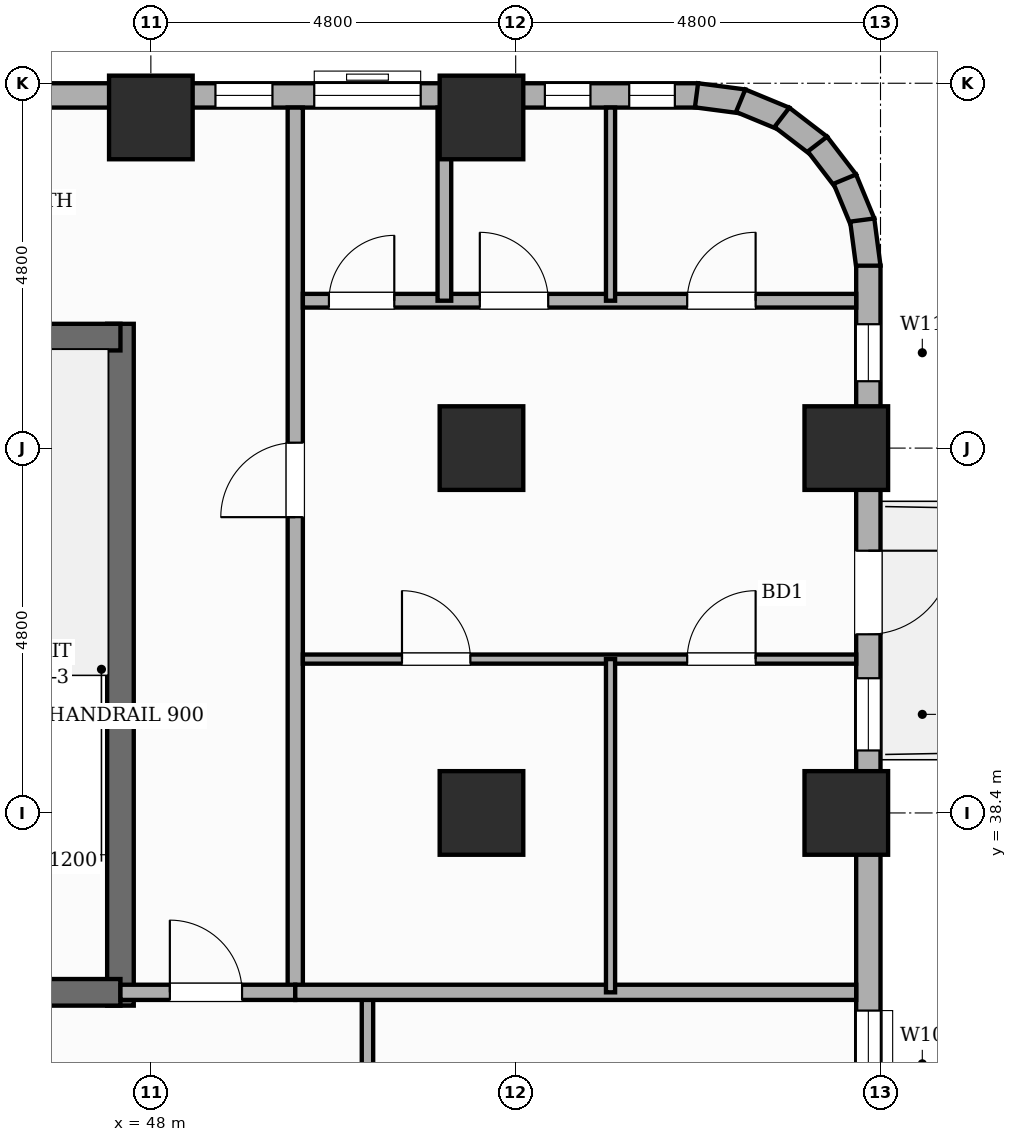
"""IFC4 building model, lengths in metres.
Left out: names, types, materials, properties, quantities, classifications, styles, units other than length and angle.
Written with IfcOpenShell. Run it as: python <this file> out.ifc"""

import sys

from ifc_helpers import new_model, si_unit, direction, frame, frame_2d, origin, origin_2d, place, context, subcontext, project, spatial, rectangle, extrude, element, fill, save


model = new_model("IFC4")
c1 = context("Model", 3, precision=1e-05, world=origin(), true_north=direction((0.0, 1.0)))
c2 = subcontext(c1, "Body", "Model", "MODEL_VIEW")
j1 = project(units=[si_unit("LENGTHUNIT", "METRE"), si_unit("PLANEANGLEUNIT", "RADIAN")], contexts=[c1])
p1 = place(None, origin())
s1 = spatial("IfcSite", under=j1, at=p1, CompositionType="ELEMENT")
p2 = place(p1, origin())
s2 = spatial("IfcBuilding", under=s1, at=p2, CompositionType="ELEMENT")
p3 = place(p2, frame((0.0, 0.0, 68.2)))
s3 = spatial("IfcBuildingStorey", under=s2, at=p3, CompositionType="ELEMENT", Elevation=68.2)
p4 = place(p3, frame((47.6, 35.865, 0.0), z_axis=(0.0, 0.0, 1.0), x_axis=(0.0, 1.0, 0.0)))
e1 = element("IfcWall", 1, at=p4, inside=s3, PredefinedType="SHEAR", context=c2, shape_type="SweptSolid", body=[
    extrude(rectangle(XDim=8.97, YDim=0.35, at=frame_2d((4.485, 0.0))), origin(), (0.0, 0.0, 1.0), 3.6),
])
for number, where, z_axis, x_axis in (
    (2, (44.02, 36.04, 0.0), (0.0, 0.0, 1.0), (1.0, 0.0, 0.0)),
    (3, (44.02, 44.66, 0.0), (0.0, 0.0, 1.0), (1.0, 0.0, 0.0)),
):
    element("IfcWall", number, at=place(p3, frame(where, z_axis=z_axis, x_axis=x_axis)), inside=s3, PredefinedType="SHEAR", context=c2, shape_type="SweptSolid", body=[
        extrude(rectangle(XDim=3.58, YDim=0.35, at=frame_2d((1.79, 0.0))), origin(), (0.0, 0.0, 1.0), 3.6),
    ])
for number, where, z_axis, x_axis in (
    (4, (48.0, 47.55, 0.0), (0.0, 0.0, 1.0), (1.0, 0.0, 0.0)),
    (5, (52.35, 38.4, 0.0), (0.0, 0.0, 1.0), (1.0, 0.0, 0.0)),
    (6, (52.35, 43.2, 0.0), (0.0, 0.0, 1.0), (1.0, 0.0, 0.0)),
    (7, (52.35, 47.55, 0.0), (0.0, 0.0, 1.0), (1.0, 0.0, 0.0)),
    (8, (57.15, 38.4, 0.0), (0.0, 0.0, 1.0), (1.0, 0.0, 0.0)),
    (9, (57.15, 43.2, 0.0), (0.0, 0.0, 1.0), (1.0, 0.0, 0.0)),
):
    element("IfcColumn", number, at=place(p3, frame(where, z_axis=z_axis, x_axis=x_axis)), inside=s3, PredefinedType="COLUMN", context=c2, shape_type="SweptSolid", body=[
        extrude(rectangle(XDim=1.1, YDim=1.1, at=origin_2d()), origin(), (0.0, 0.0, 1.0), 3.6),
    ])
p5 = place(p3, frame((7.2, 47.84, 0.0), z_axis=(0.0, 0.0, 1.0), x_axis=(1.0, 0.0, 0.0)))
e10 = element("IfcWall", 10, at=p5, inside=s3, PredefinedType="STANDARD", context=c2, shape_type="SweptSolid", body=[
    extrude(rectangle(XDim=48.0, YDim=0.32, at=frame_2d((24.0, 0.0))), origin(), (0.0, 0.0, 1.0), 2.53),
])
p6 = place(p5, frame((28.803, 0.0, 0.65)))
e11 = element("IfcOpeningElement", 11, at=p6, cuts=e10, PredefinedType="OPENING", context=c2, shape_type="SweptSolid", body=[
    extrude(rectangle(XDim=1.4, YDim=1.1, at=frame_2d((0.7, 0.55))), frame((0.0, 0.17, 0.0), z_axis=(0.0, -1.0, 0.0), x_axis=(1.0, 0.0, 0.0)), (0.0, 0.0, 1.0), 0.34),
])
p7 = place(p5, frame((47.094, 0.0, 0.45)))
e12 = element("IfcOpeningElement", 12, at=p7, cuts=e10, PredefinedType="OPENING", context=c2, shape_type="SweptSolid", body=[
    extrude(rectangle(XDim=0.6, YDim=1.8, at=frame_2d((0.3, 0.9))), frame((0.0, 0.17, 0.0), z_axis=(0.0, -1.0, 0.0), x_axis=(1.0, 0.0, 0.0)), (0.0, 0.0, 1.0), 0.34),
])
p8 = place(p5, frame((18.74, 0.0, 0.45)))
e13 = element("IfcOpeningElement", 13, at=p8, cuts=e10, PredefinedType="OPENING", context=c2, shape_type="SweptSolid", body=[
    extrude(rectangle(XDim=0.95, YDim=1.8, at=frame_2d((0.475, 0.9))), frame((0.0, 0.17, 0.0), z_axis=(0.0, -1.0, 0.0), x_axis=(1.0, 0.0, 0.0)), (0.0, 0.0, 1.0), 0.34),
])
p9 = place(p5, frame((41.65, 0.0, 0.45)))
e14 = element("IfcOpeningElement", 14, at=p9, cuts=e10, PredefinedType="OPENING", context=c2, shape_type="SweptSolid", body=[
    extrude(rectangle(XDim=0.75, YDim=1.8, at=frame_2d((0.375, 0.9))), frame((0.0, 0.17, 0.0), z_axis=(0.0, -1.0, 0.0), x_axis=(1.0, 0.0, 0.0)), (0.0, 0.0, 1.0), 0.34),
])
p10 = place(p5, frame((37.736, 0.0, 0.65)))
e15 = element("IfcOpeningElement", 15, at=p10, cuts=e10, PredefinedType="OPENING", context=c2, shape_type="SweptSolid", body=[
    extrude(rectangle(XDim=1.4, YDim=1.1, at=frame_2d((0.7, 0.55))), frame((0.0, 0.17, 0.0), z_axis=(0.0, -1.0, 0.0), x_axis=(1.0, 0.0, 0.0)), (0.0, 0.0, 1.0), 0.34),
])
p11 = place(p5, frame((0.47, 0.0, 0.45)))
e16 = element("IfcOpeningElement", 16, at=p11, cuts=e10, PredefinedType="OPENING", context=c2, shape_type="SweptSolid", body=[
    extrude(rectangle(XDim=0.95, YDim=1.8, at=frame_2d((0.475, 0.9))), frame((0.0, 0.17, 0.0), z_axis=(0.0, -1.0, 0.0), x_axis=(1.0, 0.0, 0.0)), (0.0, 0.0, 1.0), 0.34),
])
p12 = place(p5, frame((10.215, 0.0, 0.45)))
e17 = element("IfcOpeningElement", 17, at=p12, cuts=e10, PredefinedType="OPENING", context=c2, shape_type="SweptSolid", body=[
    extrude(rectangle(XDim=0.95, YDim=1.8, at=frame_2d((0.475, 0.9))), frame((0.0, 0.17, 0.0), z_axis=(0.0, -1.0, 0.0), x_axis=(1.0, 0.0, 0.0)), (0.0, 0.0, 1.0), 0.34),
])
p13 = place(p5, frame((23.43, 0.0, 0.65)))
e18 = element("IfcOpeningElement", 18, at=p13, cuts=e10, PredefinedType="OPENING", context=c2, shape_type="SweptSolid", body=[
    extrude(rectangle(XDim=1.4, YDim=1.1, at=frame_2d((0.7, 0.55))), frame((0.0, 0.17, 0.0), z_axis=(0.0, -1.0, 0.0), x_axis=(1.0, 0.0, 0.0)), (0.0, 0.0, 1.0), 0.34),
])
p14 = place(p5, frame((42.95, 0.0, 0.65)))
e19 = element("IfcOpeningElement", 19, at=p14, cuts=e10, PredefinedType="OPENING", context=c2, shape_type="SweptSolid", body=[
    extrude(rectangle(XDim=1.4, YDim=1.1, at=frame_2d((0.7, 0.55))), frame((0.0, 0.17, 0.0), z_axis=(0.0, -1.0, 0.0), x_axis=(1.0, 0.0, 0.0)), (0.0, 0.0, 1.0), 0.34),
])
p15 = place(p5, frame((45.984, 0.0, 0.45)))
e20 = element("IfcOpeningElement", 20, at=p15, cuts=e10, PredefinedType="OPENING", context=c2, shape_type="SweptSolid", body=[
    extrude(rectangle(XDim=0.6, YDim=1.8, at=frame_2d((0.3, 0.9))), frame((0.0, 0.17, 0.0), z_axis=(0.0, -1.0, 0.0), x_axis=(1.0, 0.0, 0.0)), (0.0, 0.0, 1.0), 0.34),
])
for number, where, z_axis, x_axis in (
    (21, (55.179, 47.841, 0.0), (0.0, 0.0, 1.0), (0.991, -0.131, 0.0)),
    (22, (55.76, 47.771, 0.0), (0.0, 0.0, 1.0), (0.924, -0.383, 0.0)),
):
    element("IfcWall", number, at=place(p3, frame(where, z_axis=z_axis, x_axis=x_axis)), inside=s3, PredefinedType="STANDARD", context=c2, shape_type="SweptSolid", body=[
        extrude(rectangle(XDim=0.626, YDim=0.32, at=frame_2d((0.313, 0.0))), origin(), (0.0, 0.0, 1.0), 3.35),
    ])
p16 = place(p3, frame((56.302, 47.552, 0.0), z_axis=(0.0, 0.0, 1.0), x_axis=(0.793549926411, -0.608505147302, 0.0)))
e23 = element("IfcWall", 23, at=p16, inside=s3, PredefinedType="STANDARD", context=c2, shape_type="SweptSolid", body=[
    extrude(rectangle(XDim=0.627, YDim=0.32, at=frame_2d((0.313, 0.0))), origin(), (0.0, 0.0, 1.0), 3.35),
])
for number, where, z_axis, x_axis in (
    (24, (56.77, 47.2, 0.0), (0.0, 0.0, 1.0), (0.609, -0.793, 0.0)),
    (25, (57.131, 46.739, 0.0), (0.0, 0.0, 1.0), (0.383, -0.924, 0.0)),
    (26, (57.36, 46.2, 0.0), (0.0, 0.0, 1.0), (0.131, -0.991, 0.0)),
):
    element("IfcWall", number, at=place(p3, frame(where, z_axis=z_axis, x_axis=x_axis)), inside=s3, PredefinedType="STANDARD", context=c2, shape_type="SweptSolid", body=[
        extrude(rectangle(XDim=0.626, YDim=0.32, at=frame_2d((0.313, 0.0))), origin(), (0.0, 0.0, 1.0), 3.35),
    ])
p17 = place(p3, frame((57.44, 45.6, 0.0), z_axis=(0.0, 0.0, 1.0), x_axis=(0.0, -1.0, 0.0)))
e27 = element("IfcWall", 27, at=p17, inside=s3, PredefinedType="STANDARD", context=c2, shape_type="SweptSolid", body=[
    extrude(rectangle(XDim=14.4, YDim=0.32, at=frame_2d((7.2, 0.0))), origin(), (0.0, 0.0, 1.0), 2.53),
])
p18 = place(p17, frame((3.75, 0.0, 0.0)))
e28 = element("IfcOpeningElement", 28, at=p18, cuts=e27, PredefinedType="OPENING", context=c2, shape_type="SweptSolid", body=[
    extrude(rectangle(XDim=1.1, YDim=2.15, at=frame_2d((0.55, 1.075))), frame((0.0, 0.17, 0.0), z_axis=(0.0, -1.0, 0.0), x_axis=(1.0, 0.0, 0.0)), (0.0, 0.0, 1.0), 0.34),
])
p19 = place(p17, frame((5.428, 0.0, 0.45)))
e29 = element("IfcOpeningElement", 29, at=p19, cuts=e27, PredefinedType="OPENING", context=c2, shape_type="SweptSolid", body=[
    extrude(rectangle(XDim=0.95, YDim=1.8, at=frame_2d((0.475, 0.9))), frame((0.0, 0.17, 0.0), z_axis=(0.0, -1.0, 0.0), x_axis=(1.0, 0.0, 0.0)), (0.0, 0.0, 1.0), 0.34),
])
p20 = place(p17, frame((9.8, 0.0, 0.65)))
e30 = element("IfcOpeningElement", 30, at=p20, cuts=e27, PredefinedType="OPENING", context=c2, shape_type="SweptSolid", body=[
    extrude(rectangle(XDim=1.4, YDim=1.1, at=frame_2d((0.7, 0.55))), frame((0.0, 0.17, 0.0), z_axis=(0.0, -1.0, 0.0), x_axis=(1.0, 0.0, 0.0)), (0.0, 0.0, 1.0), 0.34),
])
p21 = place(p17, frame((0.771, 0.0, 0.45)))
e31 = element("IfcOpeningElement", 31, at=p21, cuts=e27, PredefinedType="OPENING", context=c2, shape_type="SweptSolid", body=[
    extrude(rectangle(XDim=0.75, YDim=1.8, at=frame_2d((0.375, 0.9))), frame((0.0, 0.17, 0.0), z_axis=(0.0, -1.0, 0.0), x_axis=(1.0, 0.0, 0.0)), (0.0, 0.0, 1.0), 0.34),
])
p22 = place(p3, frame((49.9, 36.04, 0.0), z_axis=(0.0, 0.0, 1.0), x_axis=(0.0, 1.0, 0.0)))
e32 = element("IfcWall", 32, at=p22, inside=s3, PredefinedType="PARTITIONING", context=c2, shape_type="SweptSolid", body=[
    extrude(rectangle(XDim=11.64, YDim=0.2, at=frame_2d((5.82, 0.0))), origin(), (0.0, 0.0, 1.0), 3.35),
])
p23 = place(p22, frame((6.251, 0.0, 0.0)))
e33 = element("IfcOpeningElement", 33, at=p23, cuts=e32, PredefinedType="OPENING", context=c2, shape_type="SweptSolid", body=[
    extrude(rectangle(XDim=0.98, YDim=2.18, at=frame_2d((0.49, 1.09))), frame((0.0, 0.11, 0.0), z_axis=(0.0, -1.0, 0.0), x_axis=(1.0, 0.0, 0.0)), (0.0, 0.0, 1.0), 0.22),
])
p24 = place(p3, frame((47.6, 36.04, 0.0), z_axis=(0.0, 0.0, 1.0), x_axis=(1.0, 0.0, 0.0)))
e34 = element("IfcWall", 34, at=p24, inside=s3, PredefinedType="PARTITIONING", context=c2, shape_type="SweptSolid", body=[
    extrude(rectangle(XDim=2.3, YDim=0.2, at=frame_2d((1.15, 0.0))), origin(), (0.0, 0.0, 1.0), 3.35),
])
p25 = place(p24, frame((0.65, 0.0, 0.0)))
e35 = element("IfcOpeningElement", 35, at=p25, cuts=e34, PredefinedType="OPENING", context=c2, shape_type="SweptSolid", body=[
    extrude(rectangle(XDim=0.95, YDim=2.15, at=frame_2d((0.475, 1.075))), frame((0.0, 0.11, 0.0), z_axis=(0.0, -1.0, 0.0), x_axis=(1.0, 0.0, 0.0)), (0.0, 0.0, 1.0), 0.22),
])
p26 = place(p3, frame((50.85, 29.12, 0.0), z_axis=(0.0, 0.0, 1.0), x_axis=(0.0, 1.0, 0.0)))
e36 = element("IfcWall", 36, at=p26, inside=s3, PredefinedType="PARTITIONING", context=c2, shape_type="SweptSolid", body=[
    extrude(rectangle(XDim=6.92, YDim=0.15, at=frame_2d((3.46, 0.0))), origin(), (0.0, 0.0, 1.0), 3.35),
])
p27 = place(p26, frame((2.24, 0.0, 0.0)))
e37 = element("IfcOpeningElement", 37, at=p27, cuts=e36, PredefinedType="OPENING", context=c2, shape_type="SweptSolid", body=[
    extrude(rectangle(XDim=0.9, YDim=2.15, at=frame_2d((0.45, 1.075))), frame((0.0, 0.085, 0.0), z_axis=(0.0, -1.0, 0.0), x_axis=(1.0, 0.0, 0.0)), (0.0, 0.0, 1.0), 0.17),
])
p28 = place(p3, frame((49.9, 36.04, 0.0), z_axis=(0.0, 0.0, 1.0), x_axis=(1.0, 0.0, 0.0)))
e38 = element("IfcWall", 38, at=p28, inside=s3, PredefinedType="SOLIDWALL", context=c2, shape_type="SweptSolid", body=[
    extrude(rectangle(XDim=7.38, YDim=0.2, at=frame_2d((3.69, 0.0))), origin(), (0.0, 0.0, 1.0), 3.35),
])
p29 = place(p3, frame((50.0, 45.139, 0.0), z_axis=(0.0, 0.0, 1.0), x_axis=(1.0, 0.0, 0.0)))
e39 = element("IfcWall", 39, at=p29, inside=s3, PredefinedType="PLUMBINGWALL", context=c2, shape_type="SweptSolid", body=[
    extrude(rectangle(XDim=7.28, YDim=0.18, at=frame_2d((3.64, 0.0))), origin(), (0.0, 0.0, 1.0), 3.35),
])
p30 = place(p29, frame((0.343, 0.0, 0.0)))
e40 = element("IfcOpeningElement", 40, at=p30, cuts=e39, PredefinedType="OPENING", context=c2, shape_type="SweptSolid", body=[
    extrude(rectangle(XDim=0.86, YDim=2.1, at=frame_2d((0.43, 1.05))), frame((0.0, 0.1, 0.0), z_axis=(0.0, -1.0, 0.0), x_axis=(1.0, 0.0, 0.0)), (0.0, 0.0, 1.0), 0.2),
])
p31 = place(p29, frame((2.328, 0.0, 0.0)))
e41 = element("IfcOpeningElement", 41, at=p31, cuts=e39, PredefinedType="OPENING", context=c2, shape_type="SweptSolid", body=[
    extrude(rectangle(XDim=0.9, YDim=2.15, at=frame_2d((0.45, 1.075))), frame((0.0, 0.1, 0.0), z_axis=(0.0, -1.0, 0.0), x_axis=(1.0, 0.0, 0.0)), (0.0, 0.0, 1.0), 0.2),
])
p32 = place(p29, frame((5.057, 0.0, 0.0)))
e42 = element("IfcOpeningElement", 42, at=p32, cuts=e39, PredefinedType="OPENING", context=c2, shape_type="SweptSolid", body=[
    extrude(rectangle(XDim=0.9, YDim=2.15, at=frame_2d((0.45, 1.075))), frame((0.0, 0.1, 0.0), z_axis=(0.0, -1.0, 0.0), x_axis=(1.0, 0.0, 0.0)), (0.0, 0.0, 1.0), 0.2),
])
p33 = place(p3, frame((50.0, 40.424, 0.0), z_axis=(0.0, 0.0, 1.0), x_axis=(1.0, 0.0, 0.0)))
e43 = element("IfcWall", 43, at=p33, inside=s3, PredefinedType="PARTITIONING", context=c2, shape_type="SweptSolid", body=[
    extrude(rectangle(XDim=7.28, YDim=0.12, at=frame_2d((3.64, 0.0))), origin(), (0.0, 0.0, 1.0), 3.35),
])
p34 = place(p33, frame((1.304, 0.0, 0.0)))
e44 = element("IfcOpeningElement", 44, at=p34, cuts=e43, PredefinedType="OPENING", context=c2, shape_type="SweptSolid", body=[
    extrude(rectangle(XDim=0.9, YDim=2.15, at=frame_2d((0.45, 1.075))), frame((0.0, 0.07, 0.0), z_axis=(0.0, -1.0, 0.0), x_axis=(1.0, 0.0, 0.0)), (0.0, 0.0, 1.0), 0.14),
])
p35 = place(p33, frame((5.057, 0.0, 0.0)))
e45 = element("IfcOpeningElement", 45, at=p35, cuts=e43, PredefinedType="OPENING", context=c2, shape_type="SweptSolid", body=[
    extrude(rectangle(XDim=0.9, YDim=2.15, at=frame_2d((0.45, 1.075))), frame((0.0, 0.07, 0.0), z_axis=(0.0, -1.0, 0.0), x_axis=(1.0, 0.0, 0.0)), (0.0, 0.0, 1.0), 0.14),
])
p36 = place(p3, frame((54.048, 36.04, 0.0), z_axis=(0.0, 0.0, 1.0), x_axis=(0.0, 1.0, 0.0)))
e46 = element("IfcWall", 46, at=p36, inside=s3, PredefinedType="PARTITIONING", context=c2, shape_type="SweptSolid", body=[
    extrude(rectangle(XDim=4.384, YDim=0.12, at=frame_2d((2.192, 0.0))), origin(), (0.0, 0.0, 1.0), 3.35),
])
p37 = place(p3, frame((51.862, 45.139, 0.0), z_axis=(0.0, 0.0, 1.0), x_axis=(0.0, 1.0, 0.0)))
e47 = element("IfcWall", 47, at=p37, inside=s3, PredefinedType="PLUMBINGWALL", context=c2, shape_type="SweptSolid", body=[
    extrude(rectangle(XDim=2.541, YDim=0.18, at=frame_2d((1.271, 0.0))), origin(), (0.0, 0.0, 1.0), 3.35),
])
p38 = place(p3, frame((54.048, 45.139, 0.0), z_axis=(0.0, 0.0, 1.0), x_axis=(0.0, 1.0, 0.0)))
e48 = element("IfcWall", 48, at=p38, inside=s3, PredefinedType="PARTITIONING", context=c2, shape_type="SweptSolid", body=[
    extrude(rectangle(XDim=2.541, YDim=0.12, at=frame_2d((1.271, 0.0))), origin(), (0.0, 0.0, 1.0), 3.35),
])
p39 = place(p7, origin())
e49 = element("IfcWindow", 49, at=p39, inside=s3, PartitioningType="SINGLE_PANEL", PredefinedType="WINDOW", context=c2, shape_type="SweptSolid", body=[
    extrude(rectangle(XDim=0.6, YDim=1.8, at=frame_2d((0.3, 0.9))), frame((0.0, 0.03, 0.0), z_axis=(0.0, -1.0, 0.0), x_axis=(1.0, 0.0, 0.0)), (0.0, 0.0, 1.0), 0.06),
])
fill(e12, e49)
p40 = place(p9, origin())
e50 = element("IfcWindow", 50, at=p40, inside=s3, PartitioningType="SINGLE_PANEL", PredefinedType="WINDOW", context=c2, shape_type="SweptSolid", body=[
    extrude(rectangle(XDim=0.75, YDim=1.8, at=frame_2d((0.375, 0.9))), frame((0.0, 0.03, 0.0), z_axis=(0.0, -1.0, 0.0), x_axis=(1.0, 0.0, 0.0)), (0.0, 0.0, 1.0), 0.06),
])
fill(e14, e50)
p41 = place(p14, origin())
e51 = element("IfcWindow", 51, at=p41, inside=s3, PartitioningType="SINGLE_PANEL", PredefinedType="WINDOW", context=c2, shape_type="SweptSolid", body=[
    extrude(rectangle(XDim=1.4, YDim=1.1, at=frame_2d((0.7, 0.55))), frame((0.0, 0.03, 0.0), z_axis=(0.0, -1.0, 0.0), x_axis=(1.0, 0.0, 0.0)), (0.0, 0.0, 1.0), 0.06),
])
fill(e19, e51)
p42 = place(p15, origin())
e52 = element("IfcWindow", 52, at=p42, inside=s3, PartitioningType="SINGLE_PANEL", PredefinedType="WINDOW", context=c2, shape_type="SweptSolid", body=[
    extrude(rectangle(XDim=0.6, YDim=1.8, at=frame_2d((0.3, 0.9))), frame((0.0, 0.03, 0.0), z_axis=(0.0, -1.0, 0.0), x_axis=(1.0, 0.0, 0.0)), (0.0, 0.0, 1.0), 0.06),
])
fill(e20, e52)
p43 = place(p18, origin())
e53 = element("IfcDoor", 53, at=p43, inside=s3, OperationType="SINGLE_SWING_LEFT", PredefinedType="DOOR", context=c2, shape_type="SweptSolid", body=[
    extrude(rectangle(XDim=1.1, YDim=2.15, at=frame_2d((0.55, 1.075))), frame((0.0, 0.025, 0.0), z_axis=(0.0, -1.0, 0.0), x_axis=(1.0, 0.0, 0.0)), (0.0, 0.0, 1.0), 0.05),
])
fill(e28, e53)
p44 = place(p19, origin())
e54 = element("IfcWindow", 54, at=p44, inside=s3, PartitioningType="SINGLE_PANEL", PredefinedType="WINDOW", context=c2, shape_type="SweptSolid", body=[
    extrude(rectangle(XDim=0.95, YDim=1.8, at=frame_2d((0.475, 0.9))), frame((0.0, 0.03, 0.0), z_axis=(0.0, -1.0, 0.0), x_axis=(1.0, 0.0, 0.0)), (0.0, 0.0, 1.0), 0.06),
])
fill(e29, e54)
p45 = place(p20, origin())
e55 = element("IfcWindow", 55, at=p45, inside=s3, PartitioningType="SINGLE_PANEL", PredefinedType="WINDOW", context=c2, shape_type="SweptSolid", body=[
    extrude(rectangle(XDim=1.4, YDim=1.1, at=frame_2d((0.7, 0.55))), frame((0.0, 0.03, 0.0), z_axis=(0.0, -1.0, 0.0), x_axis=(1.0, 0.0, 0.0)), (0.0, 0.0, 1.0), 0.06),
])
fill(e30, e55)
p46 = place(p21, origin())
e56 = element("IfcWindow", 56, at=p46, inside=s3, PartitioningType="SINGLE_PANEL", PredefinedType="WINDOW", context=c2, shape_type="SweptSolid", body=[
    extrude(rectangle(XDim=0.75, YDim=1.8, at=frame_2d((0.375, 0.9))), frame((0.0, 0.03, 0.0), z_axis=(0.0, -1.0, 0.0), x_axis=(1.0, 0.0, 0.0)), (0.0, 0.0, 1.0), 0.06),
])
fill(e31, e56)
p47 = place(p25, origin())
e57 = element("IfcDoor", 57, at=p47, inside=s3, OperationType="SINGLE_SWING_LEFT", PredefinedType="DOOR", context=c2, shape_type="SweptSolid", body=[
    extrude(rectangle(XDim=0.95, YDim=2.15, at=frame_2d((0.475, 1.075))), frame((0.0, 0.025, 0.0), z_axis=(0.0, -1.0, 0.0), x_axis=(1.0, 0.0, 0.0)), (0.0, 0.0, 1.0), 0.05),
])
fill(e35, e57)
p48 = place(p23, origin())
e58 = element("IfcDoor", 58, at=p48, inside=s3, OperationType="SINGLE_SWING_LEFT", PredefinedType="DOOR", context=c2, shape_type="SweptSolid", body=[
    extrude(rectangle(XDim=0.98, YDim=2.18, at=frame_2d((0.49, 1.09))), frame((0.0, 0.025, 0.0), z_axis=(0.0, -1.0, 0.0), x_axis=(1.0, 0.0, 0.0)), (0.0, 0.0, 1.0), 0.05),
])
fill(e33, e58)
p49 = place(p34, origin())
e59 = element("IfcDoor", 59, at=p49, inside=s3, OperationType="SINGLE_SWING_LEFT", PredefinedType="DOOR", context=c2, shape_type="SweptSolid", body=[
    extrude(rectangle(XDim=0.9, YDim=2.15, at=frame_2d((0.45, 1.075))), frame((0.0, 0.025, 0.0), z_axis=(0.0, -1.0, 0.0), x_axis=(1.0, 0.0, 0.0)), (0.0, 0.0, 1.0), 0.05),
])
fill(e44, e59)
p50 = place(p35, origin())
e60 = element("IfcDoor", 60, at=p50, inside=s3, OperationType="SINGLE_SWING_RIGHT", PredefinedType="DOOR", context=c2, shape_type="SweptSolid", body=[
    extrude(rectangle(XDim=0.9, YDim=2.15, at=frame_2d((0.45, 1.075))), frame((0.0, 0.025, 0.0), z_axis=(0.0, -1.0, 0.0), x_axis=(1.0, 0.0, 0.0)), (0.0, 0.0, 1.0), 0.05),
])
fill(e45, e60)
p51 = place(p30, origin())
e61 = element("IfcDoor", 61, at=p51, inside=s3, OperationType="SINGLE_SWING_RIGHT", PredefinedType="DOOR", context=c2, shape_type="SweptSolid", body=[
    extrude(rectangle(XDim=0.86, YDim=2.1, at=frame_2d((0.43, 1.05))), frame((0.0, 0.025, 0.0), z_axis=(0.0, -1.0, 0.0), x_axis=(1.0, 0.0, 0.0)), (0.0, 0.0, 1.0), 0.05),
])
fill(e40, e61)
p52 = place(p31, origin())
e62 = element("IfcDoor", 62, at=p52, inside=s3, OperationType="SINGLE_SWING_LEFT", PredefinedType="DOOR", context=c2, shape_type="SweptSolid", body=[
    extrude(rectangle(XDim=0.9, YDim=2.15, at=frame_2d((0.45, 1.075))), frame((0.0, 0.025, 0.0), z_axis=(0.0, -1.0, 0.0), x_axis=(1.0, 0.0, 0.0)), (0.0, 0.0, 1.0), 0.05),
])
fill(e41, e62)
p53 = place(p32, origin())
e63 = element("IfcDoor", 63, at=p53, inside=s3, OperationType="SINGLE_SWING_RIGHT", PredefinedType="DOOR", context=c2, shape_type="SweptSolid", body=[
    extrude(rectangle(XDim=0.9, YDim=2.15, at=frame_2d((0.45, 1.075))), frame((0.0, 0.025, 0.0), z_axis=(0.0, -1.0, 0.0), x_axis=(1.0, 0.0, 0.0)), (0.0, 0.0, 1.0), 0.05),
])
fill(e42, e63)
save(model, sys.argv[1])
